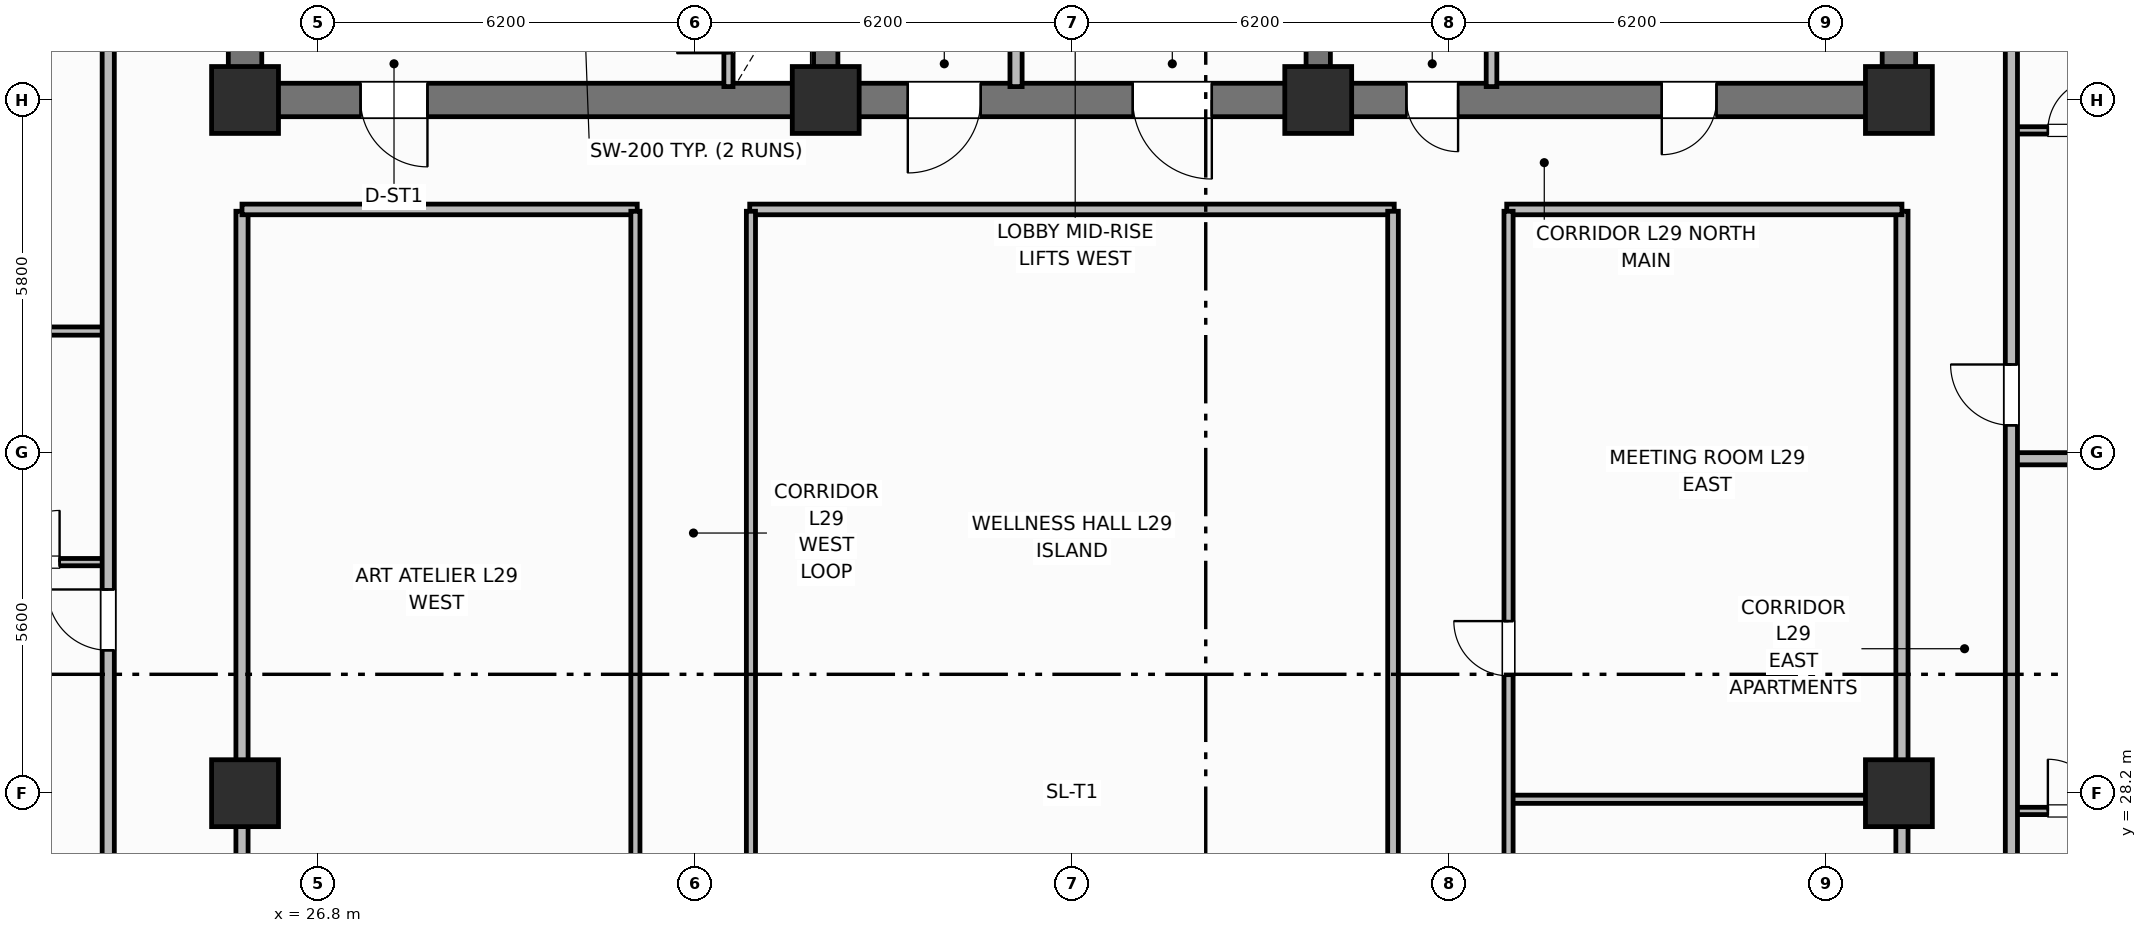
"""IFC4 building model, lengths in metres.
Left out: names, types, materials, properties, quantities, classifications, styles, units other than length and angle.
Written with IfcOpenShell. Run it as: python <this file> out.ifc"""

import sys

from ifc_helpers import new_model, si_unit, direction, frame, frame_2d, origin, origin_2d, place, context, subcontext, project, spatial, rectangle, extrude, element, fill, save


model = new_model("IFC4")
c1 = context("Model", 3, precision=1e-05, world=origin(), true_north=direction((0.0, 1.0)))
c2 = subcontext(c1, "Body", "Model", "MODEL_VIEW")
j1 = project(units=[si_unit("LENGTHUNIT", "METRE"), si_unit("PLANEANGLEUNIT", "RADIAN")], contexts=[c1])
p1 = place(None, origin())
s1 = spatial("IfcSite", under=j1, at=p1, CompositionType="ELEMENT")
p2 = place(p1, origin())
s2 = spatial("IfcBuilding", under=s1, at=p2, CompositionType="ELEMENT")
p3 = place(p2, frame((0.0, 0.0, 117.9)))
s3 = spatial("IfcBuildingStorey", under=s2, at=p3, CompositionType="ELEMENT", Elevation=117.9)
for number, where, z_axis, x_axis in (
    (1, (25.6, 39.875, 0.0), (0.0, 0.0, 1.0), (0.0, 1.0, 0.0)),
    (2, (52.8, 39.875, 0.0), (0.0, 0.0, 1.0), (0.0, 1.0, 0.0)),
):
    element("IfcWall", number, at=place(p3, frame(where, z_axis=z_axis, x_axis=x_axis)), inside=s3, PredefinedType="SHEAR", context=c2, shape_type="SweptSolid", body=[
        extrude(rectangle(XDim=5.65, YDim=0.55, at=frame_2d((2.825, 0.0))), origin(), (0.0, 0.0, 1.0), 3.7),
    ])
p4 = place(p3, frame((52.8, 39.6, 0.0), z_axis=(0.0, 0.0, 1.0), x_axis=(-1.0, 0.0, 0.0)))
e3 = element("IfcWall", 3, at=p4, inside=s3, PredefinedType="SHEAR", context=c2, shape_type="SweptSolid", body=[
    extrude(rectangle(XDim=27.2, YDim=0.55, at=frame_2d((13.6, 0.0))), origin(), (0.0, 0.0, 1.0), 3.7),
])
p5 = place(p4, frame((24.2, 0.0, 0.0)))
e4 = element("IfcOpeningElement", 4, at=p5, cuts=e3, PredefinedType="OPENING", context=c2, shape_type="SweptSolid", body=[
    extrude(rectangle(XDim=1.1, YDim=2.15, at=frame_2d((0.55, 1.075))), frame((0.0, 0.285, 0.0), z_axis=(0.0, -1.0, 0.0), x_axis=(1.0, 0.0, 0.0)), (0.0, 0.0, 1.0), 0.57),
])
p6 = place(p4, frame((15.1, 0.0, 0.0)))
e5 = element("IfcOpeningElement", 5, at=p6, cuts=e3, PredefinedType="OPENING", context=c2, shape_type="SweptSolid", body=[
    extrude(rectangle(XDim=1.2, YDim=2.15, at=frame_2d((0.6, 1.075))), frame((0.0, 0.285, 0.0), z_axis=(0.0, -1.0, 0.0), x_axis=(1.0, 0.0, 0.0)), (0.0, 0.0, 1.0), 0.57),
])
p7 = place(p4, frame((11.3, 0.0, 0.0)))
e6 = element("IfcOpeningElement", 6, at=p7, cuts=e3, PredefinedType="OPENING", context=c2, shape_type="SweptSolid", body=[
    extrude(rectangle(XDim=1.3, YDim=2.2, at=frame_2d((0.65, 1.1))), frame((0.0, 0.285, 0.0), z_axis=(0.0, -1.0, 0.0), x_axis=(1.0, 0.0, 0.0)), (0.0, 0.0, 1.0), 0.57),
])
p8 = place(p4, frame((7.25, 0.0, 0.0)))
e7 = element("IfcOpeningElement", 7, at=p8, cuts=e3, PredefinedType="OPENING", context=c2, shape_type="SweptSolid", body=[
    extrude(rectangle(XDim=0.85, YDim=2.1, at=frame_2d((0.425, 1.05))), frame((0.0, 0.285, 0.0), z_axis=(0.0, -1.0, 0.0), x_axis=(1.0, 0.0, 0.0)), (0.0, 0.0, 1.0), 0.57),
])
p9 = place(p4, frame((3.0, 0.0, 0.0)))
e8 = element("IfcOpeningElement", 8, at=p9, cuts=e3, PredefinedType="OPENING", context=c2, shape_type="SweptSolid", body=[
    extrude(rectangle(XDim=0.9, YDim=2.1, at=frame_2d((0.45, 1.05))), frame((0.0, 0.285, 0.0), z_axis=(0.0, -1.0, 0.0), x_axis=(1.0, 0.0, 0.0)), (0.0, 0.0, 1.0), 0.57),
])
for number, where, z_axis, x_axis in (
    (9, (35.15, 39.875, 0.0), (0.0, 0.0, 1.0), (0.0, 1.0, 0.0)),
    (10, (43.25, 39.875, 0.0), (0.0, 0.0, 1.0), (0.0, 1.0, 0.0)),
):
    element("IfcWall", number, at=place(p3, frame(where, z_axis=z_axis, x_axis=x_axis)), inside=s3, PredefinedType="SHEAR", context=c2, shape_type="SweptSolid", body=[
        extrude(rectangle(XDim=5.65, YDim=0.4, at=frame_2d((2.825, 0.0))), origin(), (0.0, 0.0, 1.0), 3.7),
    ])
for number, where, z_axis, x_axis in (
    (11, (25.6, 39.6, 0.0), (0.0, 0.0, 1.0), (1.0, 0.0, 0.0)),
    (12, (35.15, 39.6, 0.0), (0.0, 0.0, 1.0), (1.0, 0.0, 0.0)),
    (13, (43.25, 39.6, 0.0), (0.0, 0.0, 1.0), (1.0, 0.0, 0.0)),
    (14, (52.8, 39.6, 0.0), (0.0, 0.0, 1.0), (1.0, 0.0, 0.0)),
    (15, (25.6, 28.2, 0.0), (0.0, 0.0, 1.0), (1.0, 0.0, 0.0)),
    (16, (52.8, 28.2, 0.0), (0.0, 0.0, 1.0), (1.0, 0.0, 0.0)),
):
    element("IfcColumn", number, at=place(p3, frame(where, z_axis=z_axis, x_axis=x_axis)), inside=s3, PredefinedType="COLUMN", context=c2, shape_type="SweptSolid", body=[
        extrude(rectangle(XDim=1.1, YDim=1.1, at=origin_2d()), origin(), (0.0, 0.0, 1.0), 3.7),
    ])
p10 = place(p3, frame((33.55, 39.82, 0.0), z_axis=(0.0, 0.0, 1.0), x_axis=(0.0, 1.0, 0.0)))
e17 = element("IfcWall", 17, at=p10, inside=s3, PredefinedType="PARTITIONING", context=c2, shape_type="SweptSolid", body=[
    extrude(rectangle(XDim=2.13, YDim=0.15, at=frame_2d((1.065, 0.0))), origin(), (0.0, 0.0, 1.0), 2.53),
])
p11 = place(p10, frame((0.55, 0.0, 0.0)))
e18 = element("IfcOpeningElement", 18, at=p11, cuts=e17, PredefinedType="OPENING", context=c2, shape_type="SweptSolid", body=[
    extrude(rectangle(XDim=0.85, YDim=2.05, at=frame_2d((0.425, 1.025))), frame((0.0, 0.085, 0.0), z_axis=(0.0, -1.0, 0.0), x_axis=(1.0, 0.0, 0.0)), (0.0, 0.0, 1.0), 0.17),
])
p12 = place(p3, frame((38.28, 39.82, 0.0), z_axis=(0.0, 0.0, 1.0), x_axis=(0.0, 1.0, 0.0)))
e19 = element("IfcWall", 19, at=p12, inside=s3, PredefinedType="PARTITIONING", context=c2, shape_type="SweptSolid", body=[
    extrude(rectangle(XDim=2.73, YDim=0.2, at=frame_2d((1.365, 0.0))), origin(), (0.0, 0.0, 1.0), 2.53),
])
p13 = place(p3, frame((46.1, 39.82, 0.0), z_axis=(0.0, 0.0, 1.0), x_axis=(0.0, 1.0, 0.0)))
e20 = element("IfcWall", 20, at=p13, inside=s3, PredefinedType="PARTITIONING", context=c2, shape_type="SweptSolid", body=[
    extrude(rectangle(XDim=2.73, YDim=0.175, at=frame_2d((1.365, 0.0))), origin(), (0.0, 0.0, 1.0), 2.53),
])
for number, where, z_axis, x_axis in (
    (21, (25.55, 18.63, 0.0), (0.0, 0.0, 1.0), (0.0, 1.0, 0.0)),
    (22, (52.85, 18.63, 0.0), (0.0, 0.0, 1.0), (0.0, 1.0, 0.0)),
):
    element("IfcWall", number, at=place(p3, frame(where, z_axis=z_axis, x_axis=x_axis)), inside=s3, PredefinedType="PARTITIONING", context=c2, shape_type="SweptSolid", body=[
        extrude(rectangle(XDim=19.14, YDim=0.2, at=frame_2d((9.57, 0.0))), origin(), (0.0, 0.0, 1.0), 2.53),
    ])
p14 = place(p3, frame((25.55, 37.8, 0.0), z_axis=(0.0, 0.0, 1.0), x_axis=(1.0, 0.0, 0.0)))
e23 = element("IfcWall", 23, at=p14, inside=s3, PredefinedType="PARTITIONING", context=c2, shape_type="SweptSolid", body=[
    extrude(rectangle(XDim=6.5, YDim=0.175, at=frame_2d((3.25, 0.0))), origin(), (0.0, 0.0, 1.0), 2.53),
])
p15 = place(p3, frame((33.9, 37.8, 0.0), z_axis=(0.0, 0.0, 1.0), x_axis=(1.0, 0.0, 0.0)))
e24 = element("IfcWall", 24, at=p15, inside=s3, PredefinedType="PARTITIONING", context=c2, shape_type="SweptSolid", body=[
    extrude(rectangle(XDim=10.6, YDim=0.175, at=frame_2d((5.3, 0.0))), origin(), (0.0, 0.0, 1.0), 2.53),
])
p16 = place(p3, frame((46.35, 37.8, 0.0), z_axis=(0.0, 0.0, 1.0), x_axis=(1.0, 0.0, 0.0)))
e25 = element("IfcWall", 25, at=p16, inside=s3, PredefinedType="PARTITIONING", context=c2, shape_type="SweptSolid", body=[
    extrude(rectangle(XDim=6.5, YDim=0.175, at=frame_2d((3.25, 0.0))), origin(), (0.0, 0.0, 1.0), 2.53),
])
p17 = place(p3, frame((46.38, 28.1, 0.0), z_axis=(0.0, 0.0, 1.0), x_axis=(1.0, 0.0, 0.0)))
e26 = element("IfcWall", 26, at=p17, inside=s3, PredefinedType="PARTITIONING", context=c2, shape_type="SweptSolid", body=[
    extrude(rectangle(XDim=6.42, YDim=0.135, at=frame_2d((3.21, 0.0))), origin(), (0.0, 0.0, 1.0), 2.53),
])
p18 = place(p3, frame((32.02, 18.63, 0.0), z_axis=(0.0, 0.0, 1.0), x_axis=(0.0, 1.0, 0.0)))
e27 = element("IfcWall", 27, at=p18, inside=s3, PredefinedType="PARTITIONING", context=c2, shape_type="SweptSolid", body=[
    extrude(rectangle(XDim=19.14, YDim=0.15, at=frame_2d((9.57, 0.0))), origin(), (0.0, 0.0, 1.0), 2.53),
])
p19 = place(p18, frame((5.0, 0.0, 0.0)))
e28 = element("IfcOpeningElement", 28, at=p19, cuts=e27, PredefinedType="OPENING", context=c2, shape_type="SweptSolid", body=[
    extrude(rectangle(XDim=0.9, YDim=2.1, at=frame_2d((0.45, 1.05))), frame((0.0, 0.085, 0.0), z_axis=(0.0, -1.0, 0.0), x_axis=(1.0, 0.0, 0.0)), (0.0, 0.0, 1.0), 0.17),
])
p20 = place(p3, frame((33.92, 18.63, 0.0), z_axis=(0.0, 0.0, 1.0), x_axis=(0.0, 1.0, 0.0)))
e29 = element("IfcWall", 29, at=p20, inside=s3, PredefinedType="PARTITIONING", context=c2, shape_type="SweptSolid", body=[
    extrude(rectangle(XDim=19.14, YDim=0.15, at=frame_2d((9.57, 0.0))), origin(), (0.0, 0.0, 1.0), 2.53),
])
p21 = place(p20, frame((6.5, 0.0, 0.0)))
e30 = element("IfcOpeningElement", 30, at=p21, cuts=e29, PredefinedType="OPENING", context=c2, shape_type="SweptSolid", body=[
    extrude(rectangle(XDim=1.0, YDim=2.15, at=frame_2d((0.5, 1.075))), frame((0.0, 0.085, 0.0), z_axis=(0.0, -1.0, 0.0), x_axis=(1.0, 0.0, 0.0)), (0.0, 0.0, 1.0), 0.17),
])
p22 = place(p3, frame((44.48, 18.63, 0.0), z_axis=(0.0, 0.0, 1.0), x_axis=(0.0, 1.0, 0.0)))
e31 = element("IfcWall", 31, at=p22, inside=s3, PredefinedType="PARTITIONING", context=c2, shape_type="SweptSolid", body=[
    extrude(rectangle(XDim=19.14, YDim=0.175, at=frame_2d((9.57, 0.0))), origin(), (0.0, 0.0, 1.0), 2.53),
])
p23 = place(p3, frame((46.38, 18.63, 0.0), z_axis=(0.0, 0.0, 1.0), x_axis=(0.0, 1.0, 0.0)))
e32 = element("IfcWall", 32, at=p23, inside=s3, PredefinedType="PARTITIONING", context=c2, shape_type="SweptSolid", body=[
    extrude(rectangle(XDim=19.14, YDim=0.15, at=frame_2d((9.57, 0.0))), origin(), (0.0, 0.0, 1.0), 2.53),
])
p24 = place(p23, frame((3.0, 0.0, 0.0)))
e33 = element("IfcOpeningElement", 33, at=p24, cuts=e32, PredefinedType="OPENING", context=c2, shape_type="SweptSolid", body=[
    extrude(rectangle(XDim=0.9, YDim=2.1, at=frame_2d((0.45, 1.05))), frame((0.0, 0.085, 0.0), z_axis=(0.0, -1.0, 0.0), x_axis=(1.0, 0.0, 0.0)), (0.0, 0.0, 1.0), 0.17),
])
p25 = place(p23, frame((11.5, 0.0, 0.0)))
e34 = element("IfcOpeningElement", 34, at=p25, cuts=e32, PredefinedType="OPENING", context=c2, shape_type="SweptSolid", body=[
    extrude(rectangle(XDim=0.9, YDim=2.1, at=frame_2d((0.45, 1.05))), frame((0.0, 0.085, 0.0), z_axis=(0.0, -1.0, 0.0), x_axis=(1.0, 0.0, 0.0)), (0.0, 0.0, 1.0), 0.17),
])
p26 = place(p3, frame((21.1, 32.0, 0.0), z_axis=(0.0, 0.0, 1.0), x_axis=(1.0, 0.0, 0.0)))
e35 = element("IfcWall", 35, at=p26, inside=s3, PredefinedType="PARTITIONING", context=c2, shape_type="SweptSolid", body=[
    extrude(rectangle(XDim=2.25, YDim=0.12, at=frame_2d((1.125, 0.0))), origin(), (0.0, 0.0, 1.0), 2.53),
])
p27 = place(p26, frame((0.6, 0.0, 0.0)))
e36 = element("IfcOpeningElement", 36, at=p27, cuts=e35, PredefinedType="OPENING", context=c2, shape_type="SweptSolid", body=[
    extrude(rectangle(XDim=0.85, YDim=2.1, at=frame_2d((0.425, 1.05))), frame((0.0, 0.07, 0.0), z_axis=(0.0, -1.0, 0.0), x_axis=(1.0, 0.0, 0.0)), (0.0, 0.0, 1.0), 0.14),
])
p28 = place(p3, frame((21.1, 35.8, 0.0), z_axis=(0.0, 0.0, 1.0), x_axis=(1.0, 0.0, 0.0)))
e37 = element("IfcWall", 37, at=p28, inside=s3, PredefinedType="PARTITIONING", context=c2, shape_type="SweptSolid", body=[
    extrude(rectangle(XDim=2.25, YDim=0.135, at=frame_2d((1.125, 0.0))), origin(), (0.0, 0.0, 1.0), 2.53),
])
p29 = place(p3, frame((23.35, 10.6, 0.0), z_axis=(0.0, 0.0, 1.0), x_axis=(0.0, 1.0, 0.0)))
e38 = element("IfcWall", 38, at=p29, inside=s3, PredefinedType="PARTITIONING", context=c2, shape_type="SweptSolid", body=[
    extrude(rectangle(XDim=35.2, YDim=0.2, at=frame_2d((17.6, 0.0))), origin(), (0.0, 0.0, 1.0), 2.53),
])
p30 = place(p29, frame((2.65, 0.0, 0.0)))
e39 = element("IfcOpeningElement", 39, at=p30, cuts=e38, PredefinedType="OPENING", context=c2, shape_type="SweptSolid", body=[
    extrude(rectangle(XDim=1.0, YDim=2.15, at=frame_2d((0.5, 1.075))), frame((0.0, 0.11, 0.0), z_axis=(0.0, -1.0, 0.0), x_axis=(1.0, 0.0, 0.0)), (0.0, 0.0, 1.0), 0.22),
])
p31 = place(p29, frame((19.95, 0.0, 0.0)))
e40 = element("IfcOpeningElement", 40, at=p31, cuts=e38, PredefinedType="OPENING", context=c2, shape_type="SweptSolid", body=[
    extrude(rectangle(XDim=1.0, YDim=2.15, at=frame_2d((0.5, 1.075))), frame((0.0, 0.11, 0.0), z_axis=(0.0, -1.0, 0.0), x_axis=(1.0, 0.0, 0.0)), (0.0, 0.0, 1.0), 0.22),
])
p32 = place(p3, frame((54.65, 27.908, 0.0), z_axis=(0.0, 0.0, 1.0), x_axis=(1.0, 0.0, 0.0)))
e41 = element("IfcWall", 41, at=p32, inside=s3, PredefinedType="PARTITIONING", context=c2, shape_type="SweptSolid", body=[
    extrude(rectangle(XDim=2.25, YDim=0.12, at=frame_2d((1.125, 0.0))), origin(), (0.0, 0.0, 1.0), 2.53),
])
p33 = place(p32, frame((0.6, 0.0, 0.0)))
e42 = element("IfcOpeningElement", 42, at=p33, cuts=e41, PredefinedType="OPENING", context=c2, shape_type="SweptSolid", body=[
    extrude(rectangle(XDim=0.85, YDim=2.1, at=frame_2d((0.425, 1.05))), frame((0.0, 0.07, 0.0), z_axis=(0.0, -1.0, 0.0), x_axis=(1.0, 0.0, 0.0)), (0.0, 0.0, 1.0), 0.14),
])
p34 = place(p3, frame((54.65, 33.7, 0.0), z_axis=(0.0, 0.0, 1.0), x_axis=(1.0, 0.0, 0.0)))
e43 = element("IfcWall", 43, at=p34, inside=s3, PredefinedType="PARTITIONING", context=c2, shape_type="SweptSolid", body=[
    extrude(rectangle(XDim=9.18, YDim=0.2, at=frame_2d((4.59, 0.0))), origin(), (0.0, 0.0, 1.0), 2.53),
])
p35 = place(p3, frame((54.65, 39.1, 0.0), z_axis=(0.0, 0.0, 1.0), x_axis=(1.0, 0.0, 0.0)))
e44 = element("IfcWall", 44, at=p35, inside=s3, PredefinedType="PARTITIONING", context=c2, shape_type="SweptSolid", body=[
    extrude(rectangle(XDim=2.25, YDim=0.12, at=frame_2d((1.125, 0.0))), origin(), (0.0, 0.0, 1.0), 2.53),
])
p36 = place(p35, frame((0.6, 0.0, 0.0)))
e45 = element("IfcOpeningElement", 45, at=p36, cuts=e44, PredefinedType="OPENING", context=c2, shape_type="SweptSolid", body=[
    extrude(rectangle(XDim=0.85, YDim=2.1, at=frame_2d((0.425, 1.05))), frame((0.0, 0.07, 0.0), z_axis=(0.0, -1.0, 0.0), x_axis=(1.0, 0.0, 0.0)), (0.0, 0.0, 1.0), 0.14),
])
p37 = place(p3, frame((54.65, 10.6, 0.0), z_axis=(0.0, 0.0, 1.0), x_axis=(0.0, 1.0, 0.0)))
e46 = element("IfcWall", 46, at=p37, inside=s3, PredefinedType="PARTITIONING", context=c2, shape_type="SweptSolid", body=[
    extrude(rectangle(XDim=35.2, YDim=0.2, at=frame_2d((17.6, 0.0))), origin(), (0.0, 0.0, 1.0), 2.53),
])
p38 = place(p37, frame((2.65, 0.0, 0.0)))
e47 = element("IfcOpeningElement", 47, at=p38, cuts=e46, PredefinedType="OPENING", context=c2, shape_type="SweptSolid", body=[
    extrude(rectangle(XDim=1.0, YDim=2.15, at=frame_2d((0.5, 1.075))), frame((0.0, 0.11, 0.0), z_axis=(0.0, -1.0, 0.0), x_axis=(1.0, 0.0, 0.0)), (0.0, 0.0, 1.0), 0.22),
])
p39 = place(p37, frame((12.518, 0.0, 0.0)))
e48 = element("IfcOpeningElement", 48, at=p39, cuts=e46, PredefinedType="OPENING", context=c2, shape_type="SweptSolid", body=[
    extrude(rectangle(XDim=1.0, YDim=2.15, at=frame_2d((0.5, 1.075))), frame((0.0, 0.11, 0.0), z_axis=(0.0, -1.0, 0.0), x_axis=(1.0, 0.0, 0.0)), (0.0, 0.0, 1.0), 0.22),
])
p40 = place(p37, frame((23.65, 0.0, 0.0)))
e49 = element("IfcOpeningElement", 49, at=p40, cuts=e46, PredefinedType="OPENING", context=c2, shape_type="SweptSolid", body=[
    extrude(rectangle(XDim=1.0, YDim=2.15, at=frame_2d((0.5, 1.075))), frame((0.0, 0.11, 0.0), z_axis=(0.0, -1.0, 0.0), x_axis=(1.0, 0.0, 0.0)), (0.0, 0.0, 1.0), 0.22),
])
p41 = place(p11, origin())
e50 = element("IfcDoor", 50, at=p41, inside=s3, OperationType="SINGLE_SWING_LEFT", PredefinedType="TRAPDOOR", context=c2, shape_type="SweptSolid", body=[
    extrude(rectangle(XDim=0.85, YDim=2.05, at=frame_2d((0.425, 1.025))), frame((0.0, 0.025, 0.0), z_axis=(0.0, -1.0, 0.0), x_axis=(1.0, 0.0, 0.0)), (0.0, 0.0, 1.0), 0.05),
])
fill(e18, e50)
p42 = place(p25, origin())
e51 = element("IfcDoor", 51, at=p42, inside=s3, OperationType="SINGLE_SWING_RIGHT", PredefinedType="DOOR", context=c2, shape_type="SweptSolid", body=[
    extrude(rectangle(XDim=0.9, YDim=2.1, at=frame_2d((0.45, 1.05))), frame((0.0, 0.025, 0.0), z_axis=(0.0, -1.0, 0.0), x_axis=(1.0, 0.0, 0.0)), (0.0, 0.0, 1.0), 0.05),
])
fill(e34, e51)
p43 = place(p27, origin())
e52 = element("IfcDoor", 52, at=p43, inside=s3, OperationType="SINGLE_SWING_RIGHT", PredefinedType="DOOR", context=c2, shape_type="SweptSolid", body=[
    extrude(rectangle(XDim=0.85, YDim=2.1, at=frame_2d((0.425, 1.05))), frame((0.0, 0.025, 0.0), z_axis=(0.0, -1.0, 0.0), x_axis=(1.0, 0.0, 0.0)), (0.0, 0.0, 1.0), 0.05),
])
fill(e36, e52)
p44 = place(p31, origin())
e53 = element("IfcDoor", 53, at=p44, inside=s3, OperationType="SINGLE_SWING_RIGHT", PredefinedType="DOOR", context=c2, shape_type="SweptSolid", body=[
    extrude(rectangle(XDim=1.0, YDim=2.15, at=frame_2d((0.5, 1.075))), frame((0.0, 0.025, 0.0), z_axis=(0.0, -1.0, 0.0), x_axis=(1.0, 0.0, 0.0)), (0.0, 0.0, 1.0), 0.05),
])
fill(e40, e53)
p45 = place(p33, origin())
e54 = element("IfcDoor", 54, at=p45, inside=s3, OperationType="SINGLE_SWING_LEFT", PredefinedType="DOOR", context=c2, shape_type="SweptSolid", body=[
    extrude(rectangle(XDim=0.85, YDim=2.1, at=frame_2d((0.425, 1.05))), frame((0.0, 0.025, 0.0), z_axis=(0.0, -1.0, 0.0), x_axis=(1.0, 0.0, 0.0)), (0.0, 0.0, 1.0), 0.05),
])
fill(e42, e54)
p46 = place(p36, origin())
e55 = element("IfcDoor", 55, at=p46, inside=s3, OperationType="SINGLE_SWING_RIGHT", PredefinedType="DOOR", context=c2, shape_type="SweptSolid", body=[
    extrude(rectangle(XDim=0.85, YDim=2.1, at=frame_2d((0.425, 1.05))), frame((0.0, 0.025, 0.0), z_axis=(0.0, -1.0, 0.0), x_axis=(1.0, 0.0, 0.0)), (0.0, 0.0, 1.0), 0.05),
])
fill(e45, e55)
p47 = place(p40, origin())
e56 = element("IfcDoor", 56, at=p47, inside=s3, OperationType="SINGLE_SWING_RIGHT", PredefinedType="DOOR", context=c2, shape_type="SweptSolid", body=[
    extrude(rectangle(XDim=1.0, YDim=2.15, at=frame_2d((0.5, 1.075))), frame((0.0, 0.025, 0.0), z_axis=(0.0, -1.0, 0.0), x_axis=(1.0, 0.0, 0.0)), (0.0, 0.0, 1.0), 0.05),
])
fill(e49, e56)
p48 = place(p5, origin())
e57 = element("IfcDoor", 57, at=p48, inside=s3, OperationType="SINGLE_SWING_LEFT", PredefinedType="DOOR", context=c2, shape_type="SweptSolid", body=[
    extrude(rectangle(XDim=1.1, YDim=2.15, at=frame_2d((0.55, 1.075))), frame((0.0, 0.025, 0.0), z_axis=(0.0, -1.0, 0.0), x_axis=(1.0, 0.0, 0.0)), (0.0, 0.0, 1.0), 0.05),
])
fill(e4, e57)
p49 = place(p6, origin())
e58 = element("IfcDoor", 58, at=p49, inside=s3, OperationType="SINGLE_SWING_RIGHT", PredefinedType="DOOR", context=c2, shape_type="SweptSolid", body=[
    extrude(rectangle(XDim=1.2, YDim=2.15, at=frame_2d((0.6, 1.075))), frame((0.0, 0.025, 0.0), z_axis=(0.0, -1.0, 0.0), x_axis=(1.0, 0.0, 0.0)), (0.0, 0.0, 1.0), 0.05),
])
fill(e5, e58)
p50 = place(p7, origin())
e59 = element("IfcDoor", 59, at=p50, inside=s3, OperationType="SINGLE_SWING_LEFT", PredefinedType="DOOR", context=c2, shape_type="SweptSolid", body=[
    extrude(rectangle(XDim=1.3, YDim=2.2, at=frame_2d((0.65, 1.1))), frame((0.0, 0.025, 0.0), z_axis=(0.0, -1.0, 0.0), x_axis=(1.0, 0.0, 0.0)), (0.0, 0.0, 1.0), 0.05),
])
fill(e6, e59)
p51 = place(p8, origin())
e60 = element("IfcDoor", 60, at=p51, inside=s3, OperationType="SINGLE_SWING_LEFT", PredefinedType="DOOR", context=c2, shape_type="SweptSolid", body=[
    extrude(rectangle(XDim=0.85, YDim=2.1, at=frame_2d((0.425, 1.05))), frame((0.0, 0.025, 0.0), z_axis=(0.0, -1.0, 0.0), x_axis=(1.0, 0.0, 0.0)), (0.0, 0.0, 1.0), 0.05),
])
fill(e7, e60)
p52 = place(p9, origin())
e61 = element("IfcDoor", 61, at=p52, inside=s3, OperationType="SINGLE_SWING_RIGHT", PredefinedType="DOOR", context=c2, shape_type="SweptSolid", body=[
    extrude(rectangle(XDim=0.9, YDim=2.1, at=frame_2d((0.45, 1.05))), frame((0.0, 0.025, 0.0), z_axis=(0.0, -1.0, 0.0), x_axis=(1.0, 0.0, 0.0)), (0.0, 0.0, 1.0), 0.05),
])
fill(e8, e61)
save(model, sys.argv[1])
